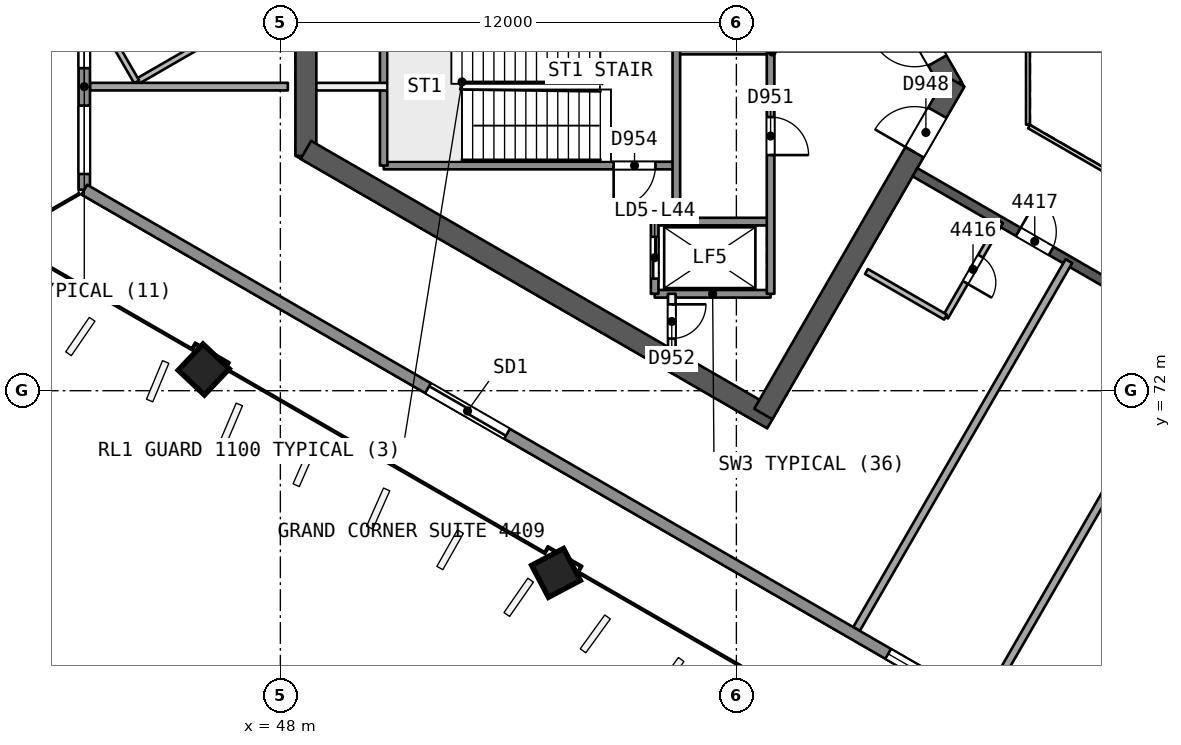
"""IFC4 building model, lengths in metres.
Left out: names, types, materials, properties, quantities, classifications, styles, units other than length and angle.
Written with IfcOpenShell. Run it as: python <this file> out.ifc"""

import sys

from ifc_helpers import new_model, si_unit, direction, frame, frame_2d, origin, origin_2d, place, context, subcontext, project, spatial, rectangle, extrude, element, fill, save


model = new_model("IFC4")
c1 = context("Model", 3, precision=1e-05, world=origin(), true_north=direction((0.0, 1.0)))
c2 = subcontext(c1, "Body", "Model", "MODEL_VIEW")
j1 = project(units=[si_unit("LENGTHUNIT", "METRE"), si_unit("PLANEANGLEUNIT", "RADIAN")], contexts=[c1])
p1 = place(None, origin())
s1 = spatial("IfcSite", under=j1, at=p1, CompositionType="ELEMENT")
p2 = place(p1, origin())
s2 = spatial("IfcBuilding", under=s1, at=p2, CompositionType="ELEMENT")
p3 = place(p2, frame((0.0, 0.0, 182.2)))
s3 = spatial("IfcBuildingStorey", under=s2, at=p3, CompositionType="ELEMENT", Elevation=182.2)
p4 = place(p3, frame((65.682, 80.0, 0.0), z_axis=(0.0, 0.0, 1.0), x_axis=(-0.500000202252, 0.866025287014, 0.0)))
e1 = element("IfcWall", 1, at=p4, inside=s3, PredefinedType="SHEAR", context=c2, shape_type="SweptSolid", body=[
    extrude(rectangle(XDim=10.221, YDim=0.55, at=frame_2d((5.111, 0.0))), origin(), (0.0, 0.0, 1.0), 3.7),
])
p5 = place(p4, frame((0.791, 0.0, 0.0)))
e2 = element("IfcOpeningElement", 2, at=p5, cuts=e1, PredefinedType="OPENING", context=c2, shape_type="SweptSolid", body=[
    extrude(rectangle(XDim=1.2, YDim=2.1, at=frame_2d((0.6, 1.05))), frame((0.0, 0.286, 0.0), z_axis=(0.0, -1.0, 0.0), x_axis=(1.0, 0.0, 0.0)), (0.0, 0.0, 1.0), 0.571),
])
p6 = place(p3, frame((48.672, 81.664, 0.0), z_axis=(0.0, 0.0, 1.0), x_axis=(0.0, -1.0, 0.0)))
e3 = element("IfcWall", 3, at=p6, inside=s3, PredefinedType="SHEAR", context=c2, shape_type="SweptSolid", body=[
    extrude(rectangle(XDim=3.487, YDim=0.55, at=frame_2d((1.743, 0.0))), origin(), (0.0, 0.0, 1.0), 3.7),
])
p7 = place(p3, frame((48.672, 78.336, 0.0), z_axis=(0.0, 0.0, 1.0), x_axis=(0.866023530946, -0.500003243837, 0.0)))
e4 = element("IfcWall", 4, at=p7, inside=s3, PredefinedType="SHEAR", context=c2, shape_type="SweptSolid", body=[
    extrude(rectangle(XDim=14.175, YDim=0.55, at=frame_2d((7.087, 0.0))), origin(), (0.0, 0.0, 1.0), 3.7),
])
p8 = place(p3, frame((60.709, 71.386, 0.0), z_axis=(0.0, 0.0, 1.0), x_axis=(0.500015938302, 0.866016201606, 0.0)))
e5 = element("IfcWall", 5, at=p8, inside=s3, PredefinedType="SHEAR", context=c2, shape_type="SweptSolid", body=[
    extrude(rectangle(XDim=10.105, YDim=0.55, at=frame_2d((5.053, 0.0))), origin(), (0.0, 0.0, 1.0), 3.7),
])
p9 = place(p8, frame((7.955, 0.0, 0.0)))
e6 = element("IfcOpeningElement", 6, at=p9, cuts=e5, PredefinedType="OPENING", context=c2, shape_type="SweptSolid", body=[
    extrude(rectangle(XDim=1.2, YDim=2.1, at=frame_2d((0.6, 1.05))), frame((0.0, 0.286, 0.0), z_axis=(0.0, -1.0, 0.0), x_axis=(1.0, 0.0, 0.0)), (0.0, 0.0, 1.0), 0.571),
])
p10 = place(p3, frame((64.7, 77.748, 0.0), z_axis=(0.0, 0.0, 1.0), x_axis=(0.866026492143, -0.499998114903, 0.0)))
e7 = element("IfcWall", 7, at=p10, inside=s3, PredefinedType="SHEAR", context=c2, shape_type="SweptSolid", body=[
    extrude(rectangle(XDim=15.588, YDim=0.25, at=frame_2d((7.794, 0.0))), origin(), (0.0, 0.0, 1.0), 3.25),
])
p11 = place(p10, frame((3.138, 0.0, 0.0)))
e8 = element("IfcOpeningElement", 8, at=p11, cuts=e7, PredefinedType="OPENING", context=c2, shape_type="SweptSolid", body=[
    extrude(rectangle(XDim=1.0, YDim=2.1, at=frame_2d((0.5, 1.05))), frame((0.0, 0.135, 0.0), z_axis=(0.0, -1.0, 0.0), x_axis=(1.0, 0.0, 0.0)), (0.0, 0.0, 1.0), 0.271),
])
p12 = place(p10, frame((6.175, 0.0, 0.0)))
e9 = element("IfcOpeningElement", 9, at=p12, cuts=e7, PredefinedType="OPENING", context=c2, shape_type="SweptSolid", body=[
    extrude(rectangle(XDim=0.9, YDim=2.1, at=frame_2d((0.45, 1.05))), frame((0.0, 0.135, 0.0), z_axis=(0.0, -1.0, 0.0), x_axis=(1.0, 0.0, 0.0)), (0.0, 0.0, 1.0), 0.271),
])
p13 = place(p10, frame((10.072, 0.0, 0.0)))
e10 = element("IfcOpeningElement", 10, at=p13, cuts=e7, PredefinedType="OPENING", context=c2, shape_type="SweptSolid", body=[
    extrude(rectangle(XDim=0.9, YDim=2.1, at=frame_2d((0.45, 1.05))), frame((0.0, 0.135, 0.0), z_axis=(0.0, -1.0, 0.0), x_axis=(1.0, 0.0, 0.0)), (0.0, 0.0, 1.0), 0.271),
])
p14 = place(p10, frame((13.53, 0.0, 0.0)))
e11 = element("IfcOpeningElement", 11, at=p14, cuts=e7, PredefinedType="OPENING", context=c2, shape_type="SweptSolid", body=[
    extrude(rectangle(XDim=1.0, YDim=2.1, at=frame_2d((0.5, 1.05))), frame((0.0, 0.135, 0.0), z_axis=(0.0, -1.0, 0.0), x_axis=(1.0, 0.0, 0.0)), (0.0, 0.0, 1.0), 0.271),
])
p15 = place(p3, frame((45.949, 72.55, 0.0), z_axis=(0.02855911485, 0.006793507689, 0.999569019734), x_axis=(-0.865323246693, 0.500760552185, 0.021320133879)))
e12 = element("IfcColumn", 12, at=p15, inside=s3, PredefinedType="COLUMN", context=c2, shape_type="SweptSolid", body=[
    extrude(rectangle(XDim=0.95, YDim=0.95, at=origin_2d()), origin(), (0.0, 0.0, 1.0), 3.702),
])
p16 = place(p3, frame((55.23, 67.192, 0.0), z_axis=(0.019328516974, 0.012138044789, 0.999739504221), x_axis=(-0.865694061334, 0.500459928951, 0.010660754407)))
e13 = element("IfcColumn", 13, at=p16, inside=s3, PredefinedType="COLUMN", context=c2, shape_type="SweptSolid", body=[
    extrude(rectangle(XDim=0.95, YDim=0.95, at=origin_2d()), origin(), (0.0, 0.0, 1.0), 3.701),
])
p17 = place(p3, frame((46.47, 81.427, 0.0), z_axis=(0.0, 0.0, 1.0), x_axis=(-0.866062058628, -0.499936506574, 0.0)))
e14 = element("IfcWall", 14, at=p17, inside=s3, PredefinedType="PARTITIONING", context=c2, shape_type="SweptSolid", body=[
    extrude(rectangle(XDim=2.6, YDim=0.15, at=frame_2d((1.3, 0.0))), origin(), (0.0, 0.0, 1.0), 3.25),
])
p18 = place(p3, frame((44.218, 80.128, 0.0), z_axis=(0.0, 0.0, 1.0), x_axis=(-0.499997745557, 0.866026705384, 0.0)))
e15 = element("IfcWall", 15, at=p18, inside=s3, PredefinedType="PARTITIONING", context=c2, shape_type="SweptSolid", body=[
    extrude(rectangle(XDim=2.457, YDim=0.15, at=frame_2d((1.228, 0.0))), origin(), (0.0, 0.0, 1.0), 3.25),
])
p19 = place(p3, frame((42.99, 80.001, 0.0), z_axis=(0.0, 0.0, 1.0), x_axis=(1.0, 0.0, 0.0)))
e16 = element("IfcWall", 16, at=p19, inside=s3, PredefinedType="PARTITIONING", context=c2, shape_type="SweptSolid", body=[
    extrude(rectangle(XDim=5.208, YDim=0.2, at=frame_2d((2.604, 0.0))), origin(), (0.0, 0.0, 1.0), 3.25),
])
p20 = place(p3, frame((66.952, 76.448, 0.0), z_axis=(0.0, 0.0, 1.0), x_axis=(-0.499987231761, -0.866032775405, 0.0)))
e17 = element("IfcWall", 17, at=p20, inside=s3, PredefinedType="PARTITIONING", context=c2, shape_type="SweptSolid", body=[
    extrude(rectangle(XDim=2.9, YDim=0.15, at=frame_2d((1.45, 0.0))), origin(), (0.0, 0.0, 1.0), 3.25),
])
p21 = place(p20, frame((1.05, 0.0, 0.0)))
e18 = element("IfcOpeningElement", 18, at=p21, cuts=e17, PredefinedType="OPENING", context=c2, shape_type="SweptSolid", body=[
    extrude(rectangle(XDim=0.8, YDim=2.1, at=frame_2d((0.4, 1.05))), frame((0.0, 0.085, 0.0), z_axis=(0.0, -1.0, 0.0), x_axis=(1.0, 0.0, 0.0)), (0.0, 0.0, 1.0), 0.171),
])
p22 = place(p3, frame((65.502, 73.937, 0.0), z_axis=(0.0, 0.0, 1.0), x_axis=(-0.865994240961, 0.500053971709, 0.0)))
e19 = element("IfcWall", 19, at=p22, inside=s3, PredefinedType="PARTITIONING", context=c2, shape_type="SweptSolid", body=[
    extrude(rectangle(XDim=2.401, YDim=0.15, at=frame_2d((1.201, 0.0))), origin(), (0.0, 0.0, 1.0), 3.25),
])
for number, where, z_axis, x_axis in (
    (20, (63.161, 65.729, 0.0), (0.0, 0.0, 1.0), (0.5, 0.866, 0.0)),
    (21, (66.536, 63.781, 0.0), (0.0, 0.0, 1.0), (0.5, 0.866, 0.0)),
):
    element("IfcWall", number, at=place(p3, frame(where, z_axis=z_axis, x_axis=x_axis)), inside=s3, PredefinedType="PARTITIONING", context=c2, shape_type="SweptSolid", body=[
        extrude(rectangle(XDim=11.178, YDim=0.2, at=frame_2d((5.589, 0.0))), origin(), (0.0, 0.0, 1.0), 3.25),
    ])
p23 = place(p3, frame((42.841, 77.289, 0.0), z_axis=(0.0, 0.0, 1.0), x_axis=(0.0, 1.0, 0.0)))
e22 = element("IfcWall", 22, at=p23, inside=s3, PredefinedType="SOLIDWALL", context=c2, shape_type="SweptSolid", body=[
    extrude(rectangle(XDim=5.421, YDim=0.3, at=frame_2d((2.711, 0.0))), origin(), (0.0, 0.0, 1.0), 3.25),
])
p24 = place(p23, frame((3.198, 0.0, 0.9)))
e23 = element("IfcOpeningElement", 23, at=p24, cuts=e22, PredefinedType="OPENING", context=c2, shape_type="SweptSolid", body=[
    extrude(rectangle(XDim=1.8, YDim=1.5, at=frame_2d((0.9, 0.75))), frame((0.0, 0.161, 0.0), z_axis=(0.0, -1.0, 0.0), x_axis=(1.0, 0.0, 0.0)), (0.0, 0.0, 1.0), 0.321),
])
p25 = place(p23, frame((0.413, 0.0, 0.9)))
e24 = element("IfcOpeningElement", 24, at=p25, cuts=e22, PredefinedType="OPENING", context=c2, shape_type="SweptSolid", body=[
    extrude(rectangle(XDim=1.8, YDim=1.5, at=frame_2d((0.9, 0.75))), frame((0.0, 0.161, 0.0), z_axis=(0.0, -1.0, 0.0), x_axis=(1.0, 0.0, 0.0)), (0.0, 0.0, 1.0), 0.321),
])
p26 = place(p3, frame((88.732, 50.794, 0.0), z_axis=(0.0, 0.0, 1.0), x_axis=(-0.866024774967, 0.500001089142, 0.0)))
e25 = element("IfcWall", 25, at=p26, inside=s3, PredefinedType="SOLIDWALL", context=c2, shape_type="SweptSolid", body=[
    extrude(rectangle(XDim=52.991, YDim=0.3, at=frame_2d((26.496, 0.0))), origin(), (0.0, 0.0, 1.0), 3.25),
])
p27 = place(p26, frame((19.06, 0.0, 0.0)))
e26 = element("IfcOpeningElement", 26, at=p27, cuts=e25, PredefinedType="OPENING", context=c2, shape_type="SweptSolid", body=[
    extrude(rectangle(XDim=2.4, YDim=2.4, at=frame_2d((1.2, 1.2))), frame((0.0, 0.161, 0.0), z_axis=(0.0, -1.0, 0.0), x_axis=(1.0, 0.0, 0.0)), (0.0, 0.0, 1.0), 0.321),
])
p28 = place(p26, frame((9.392, 0.0, 0.0)))
e27 = element("IfcOpeningElement", 27, at=p28, cuts=e25, PredefinedType="OPENING", context=c2, shape_type="SweptSolid", body=[
    extrude(rectangle(XDim=2.4, YDim=2.4, at=frame_2d((1.2, 1.2))), frame((0.0, 0.161, 0.0), z_axis=(0.0, -1.0, 0.0), x_axis=(1.0, 0.0, 0.0)), (0.0, 0.0, 1.0), 0.321),
])
p29 = place(p26, frame((40.145, 0.0, 0.0)))
e28 = element("IfcOpeningElement", 28, at=p29, cuts=e25, PredefinedType="OPENING", context=c2, shape_type="SweptSolid", body=[
    extrude(rectangle(XDim=2.4, YDim=2.4, at=frame_2d((1.2, 1.2))), frame((0.0, 0.161, 0.0), z_axis=(0.0, -1.0, 0.0), x_axis=(1.0, 0.0, 0.0)), (0.0, 0.0, 1.0), 0.321),
])
p30 = place(p26, frame((26.765, 0.0, 0.9)))
e29 = element("IfcOpeningElement", 29, at=p30, cuts=e25, PredefinedType="OPENING", context=c2, shape_type="SweptSolid", body=[
    extrude(rectangle(XDim=1.8, YDim=1.5, at=frame_2d((0.9, 0.75))), frame((0.0, 0.161, 0.0), z_axis=(0.0, -1.0, 0.0), x_axis=(1.0, 0.0, 0.0)), (0.0, 0.0, 1.0), 0.321),
])
p31 = place(p26, frame((22.867, 0.0, 0.9)))
e30 = element("IfcOpeningElement", 30, at=p31, cuts=e25, PredefinedType="OPENING", context=c2, shape_type="SweptSolid", body=[
    extrude(rectangle(XDim=1.8, YDim=1.5, at=frame_2d((0.9, 0.75))), frame((0.0, 0.161, 0.0), z_axis=(0.0, -1.0, 0.0), x_axis=(1.0, 0.0, 0.0)), (0.0, 0.0, 1.0), 0.321),
])
p32 = place(p3, frame((60.9, 80.95, 0.0), z_axis=(0.0, 0.0, 1.0), x_axis=(-1.0, 0.0, 0.0)))
e31 = element("IfcWall", 31, at=p32, inside=s3, PredefinedType="SOLIDWALL", context=c2, shape_type="SweptSolid", body=[
    extrude(rectangle(XDim=2.48, YDim=0.2, at=frame_2d((1.24, 0.0))), origin(), (0.0, 0.0, 1.0), 3.25),
])
p33 = place(p3, frame((50.82, 80.0, 0.0), z_axis=(0.0, 0.0, 1.0), x_axis=(-1.0, 0.0, 0.0)))
e32 = element("IfcWall", 32, at=p33, inside=s3, PredefinedType="PARTITIONING", context=c2, shape_type="SweptSolid", body=[
    extrude(rectangle(XDim=1.873, YDim=0.2, at=frame_2d((0.937, 0.0))), origin(), (0.0, 0.0, 1.0), 3.25),
])
p34 = place(p3, frame((58.42, 77.925, 0.0), z_axis=(0.0, 0.0, 1.0), x_axis=(-1.0, 0.0, 0.0)))
e33 = element("IfcWall", 33, at=p34, inside=s3, PredefinedType="SOLIDWALL", context=c2, shape_type="SweptSolid", body=[
    extrude(rectangle(XDim=7.7, YDim=0.2, at=frame_2d((3.85, 0.0))), origin(), (0.0, 0.0, 1.0), 3.25),
])
p35 = place(p34, frame((0.55, 0.0, 0.0)))
e34 = element("IfcOpeningElement", 34, at=p35, cuts=e33, PredefinedType="OPENING", context=c2, shape_type="SweptSolid", body=[
    extrude(rectangle(XDim=1.1, YDim=2.1, at=frame_2d((0.55, 1.05))), frame((0.0, 0.11, 0.0), z_axis=(0.0, -1.0, 0.0), x_axis=(1.0, 0.0, 0.0)), (0.0, 0.0, 1.0), 0.221),
])
for number, where, z_axis, x_axis in (
    (35, (60.9, 76.45, 0.0), (0.0, 0.0, 1.0), (-1.0, 0.0, 0.0)),
    (36, (60.9, 74.55, 0.0), (0.0, 0.0, 1.0), (-1.0, 0.0, 0.0)),
):
    element("IfcWall", number, at=place(p3, frame(where, z_axis=z_axis, x_axis=x_axis)), inside=s3, PredefinedType="SOLIDWALL", context=c2, shape_type="SweptSolid", body=[
        extrude(rectangle(XDim=3.05, YDim=0.2, at=frame_2d((1.525, 0.0))), origin(), (0.0, 0.0, 1.0), 3.25),
    ])
p36 = place(p3, frame((60.9, 85.45, 0.0), z_axis=(0.0, 0.0, 1.0), x_axis=(0.0, -1.0, 0.0)))
e37 = element("IfcWall", 37, at=p36, inside=s3, PredefinedType="SOLIDWALL", context=c2, shape_type="SweptSolid", body=[
    extrude(rectangle(XDim=10.9, YDim=0.2, at=frame_2d((5.45, 0.0))), origin(), (0.0, 0.0, 1.0), 3.25),
])
p37 = place(p36, frame((0.625, 0.0, 0.0)))
e38 = element("IfcOpeningElement", 38, at=p37, cuts=e37, PredefinedType="OPENING", context=c2, shape_type="SweptSolid", body=[
    extrude(rectangle(XDim=1.0, YDim=2.1, at=frame_2d((0.5, 1.05))), frame((0.0, 0.11, 0.0), z_axis=(0.0, -1.0, 0.0), x_axis=(1.0, 0.0, 0.0)), (0.0, 0.0, 1.0), 0.221),
])
p38 = place(p36, frame((2.875, 0.0, 0.0)))
e39 = element("IfcOpeningElement", 39, at=p38, cuts=e37, PredefinedType="OPENING", context=c2, shape_type="SweptSolid", body=[
    extrude(rectangle(XDim=1.0, YDim=2.1, at=frame_2d((0.5, 1.05))), frame((0.0, 0.11, 0.0), z_axis=(0.0, -1.0, 0.0), x_axis=(1.0, 0.0, 0.0)), (0.0, 0.0, 1.0), 0.221),
])
p39 = place(p36, frame((6.25, 0.0, 0.0)))
e40 = element("IfcOpeningElement", 40, at=p39, cuts=e37, PredefinedType="OPENING", context=c2, shape_type="SweptSolid", body=[
    extrude(rectangle(XDim=1.0, YDim=2.1, at=frame_2d((0.5, 1.05))), frame((0.0, 0.11, 0.0), z_axis=(0.0, -1.0, 0.0), x_axis=(1.0, 0.0, 0.0)), (0.0, 0.0, 1.0), 0.221),
])
p40 = place(p3, frame((58.42, 86.974, 0.0), z_axis=(0.0, 0.0, 1.0), x_axis=(0.0, -1.0, 0.0)))
e41 = element("IfcWall", 41, at=p40, inside=s3, PredefinedType="SOLIDWALL", context=c2, shape_type="SweptSolid", body=[
    extrude(rectangle(XDim=10.524, YDim=0.2, at=frame_2d((5.262, 0.0))), origin(), (0.0, 0.0, 1.0), 3.25),
])
p41 = place(p40, frame((0.312, 0.0, 0.0)))
e42 = element("IfcOpeningElement", 42, at=p41, cuts=e41, PredefinedType="OPENING", context=c2, shape_type="SweptSolid", body=[
    extrude(rectangle(XDim=0.9, YDim=2.1, at=frame_2d((0.45, 1.05))), frame((0.0, 0.11, 0.0), z_axis=(0.0, -1.0, 0.0), x_axis=(1.0, 0.0, 0.0)), (0.0, 0.0, 1.0), 0.221),
])
p42 = place(p3, frame((58.3, 74.55, 0.0), z_axis=(0.0, 0.0, 1.0), x_axis=(0.0, -1.0, 0.0)))
e43 = element("IfcWall", 43, at=p42, inside=s3, PredefinedType="PARTITIONING", context=c2, shape_type="SweptSolid", body=[
    extrude(rectangle(XDim=1.455, YDim=0.2, at=frame_2d((0.728, 0.0))), origin(), (0.0, 0.0, 1.0), 3.25),
])
p43 = place(p42, frame((0.278, 0.0, 0.0)))
e44 = element("IfcOpeningElement", 44, at=p43, cuts=e43, PredefinedType="OPENING", context=c2, shape_type="SweptSolid", body=[
    extrude(rectangle(XDim=0.9, YDim=2.1, at=frame_2d((0.45, 1.05))), frame((0.0, 0.11, 0.0), z_axis=(0.0, -1.0, 0.0), x_axis=(1.0, 0.0, 0.0)), (0.0, 0.0, 1.0), 0.221),
])
p44 = place(p3, frame((57.85, 76.45, 0.0), z_axis=(0.0, 0.0, 1.0), x_axis=(0.0, -1.0, 0.0)))
e45 = element("IfcWall", 45, at=p44, inside=s3, PredefinedType="SOLIDWALL", context=c2, shape_type="SweptSolid", body=[
    extrude(rectangle(XDim=1.9, YDim=0.2, at=frame_2d((0.95, 0.0))), origin(), (0.0, 0.0, 1.0), 3.25),
])
p45 = place(p44, frame((0.4, 0.0, 0.0)))
e46 = element("IfcOpeningElement", 46, at=p45, cuts=e45, PredefinedType="OPENING", context=c2, shape_type="SweptSolid", body=[
    extrude(rectangle(XDim=1.1, YDim=2.1, at=frame_2d((0.55, 1.05))), frame((0.0, 0.11, 0.0), z_axis=(0.0, -1.0, 0.0), x_axis=(1.0, 0.0, 0.0)), (0.0, 0.0, 1.0), 0.221),
])
p46 = place(p3, frame((50.72, 82.075, 0.0), z_axis=(0.0, 0.0, 1.0), x_axis=(0.0, -1.0, 0.0)))
e47 = element("IfcWall", 47, at=p46, inside=s3, PredefinedType="SOLIDWALL", context=c2, shape_type="SweptSolid", body=[
    extrude(rectangle(XDim=4.15, YDim=0.2, at=frame_2d((2.075, 0.0))), origin(), (0.0, 0.0, 1.0), 3.25),
])
p47 = place(p3, frame((67.672, 81.0, 0.0), z_axis=(0.0, 0.0, 1.0), x_axis=(0.0, -1.0, 0.0)))
e48 = element("IfcWall", 48, at=p47, inside=s3, PredefinedType="PARTITIONING", context=c2, shape_type="SweptSolid", body=[
    extrude(rectangle(XDim=2.0, YDim=0.1, at=frame_2d((1.0, 0.0))), origin(), (0.0, 0.0, 1.0), 3.25),
])
p48 = place(p3, frame((67.702, 78.948, 0.0), z_axis=(0.0, 0.0, 1.0), x_axis=(0.866026658274, -0.499997827154, 0.0)))
e49 = element("IfcWall", 49, at=p48, inside=s3, PredefinedType="PARTITIONING", context=c2, shape_type="SweptSolid", body=[
    extrude(rectangle(XDim=11.588, YDim=0.1, at=frame_2d((5.794, 0.0))), origin(), (0.0, 0.0, 1.0), 3.25),
])
p49 = place(p21, origin())
e50 = element("IfcDoor", 50, at=p49, inside=s3, OperationType="SINGLE_SWING_RIGHT", PredefinedType="NOTDEFINED", context=c2, shape_type="SweptSolid", body=[
    extrude(rectangle(XDim=0.8, YDim=2.1, at=frame_2d((0.4, 1.05))), frame((0.0, 0.025, 0.0), z_axis=(0.0, -1.0, 0.0), x_axis=(1.0, 0.0, 0.0)), (0.0, 0.0, 1.0), 0.05),
])
fill(e18, e50)
p50 = place(p11, origin())
e51 = element("IfcDoor", 51, at=p50, inside=s3, OperationType="SINGLE_SWING_LEFT", PredefinedType="NOTDEFINED", context=c2, shape_type="SweptSolid", body=[
    extrude(rectangle(XDim=1.0, YDim=2.1, at=frame_2d((0.5, 1.05))), frame((0.0, 0.025, 0.0), z_axis=(0.0, -1.0, 0.0), x_axis=(1.0, 0.0, 0.0)), (0.0, 0.0, 1.0), 0.05),
])
fill(e8, e51)
p51 = place(p24, origin())
e52 = element("IfcWindow", 52, at=p51, inside=s3, PartitioningType="SINGLE_PANEL", PredefinedType="WINDOW", context=c2, shape_type="SweptSolid", body=[
    extrude(rectangle(XDim=1.8, YDim=1.5, at=frame_2d((0.9, 0.75))), frame((0.0, 0.03, 0.0), z_axis=(0.0, -1.0, 0.0), x_axis=(1.0, 0.0, 0.0)), (0.0, 0.0, 1.0), 0.06),
])
fill(e23, e52)
p52 = place(p25, origin())
e53 = element("IfcWindow", 53, at=p52, inside=s3, PartitioningType="SINGLE_PANEL", PredefinedType="WINDOW", context=c2, shape_type="SweptSolid", body=[
    extrude(rectangle(XDim=1.8, YDim=1.5, at=frame_2d((0.9, 0.75))), frame((0.0, 0.03, 0.0), z_axis=(0.0, -1.0, 0.0), x_axis=(1.0, 0.0, 0.0)), (0.0, 0.0, 1.0), 0.06),
])
fill(e24, e53)
p53 = place(p29, origin())
e54 = element("IfcDoor", 54, at=p53, inside=s3, OperationType="SLIDING_TO_LEFT", PredefinedType="NOTDEFINED", context=c2, shape_type="SweptSolid", body=[
    extrude(rectangle(XDim=2.4, YDim=2.4, at=frame_2d((1.2, 1.2))), frame((0.0, 0.025, 0.0), z_axis=(0.0, -1.0, 0.0), x_axis=(1.0, 0.0, 0.0)), (0.0, 0.0, 1.0), 0.05),
])
fill(e28, e54)
p54 = place(p30, origin())
e55 = element("IfcWindow", 55, at=p54, inside=s3, PartitioningType="SINGLE_PANEL", PredefinedType="WINDOW", context=c2, shape_type="SweptSolid", body=[
    extrude(rectangle(XDim=1.8, YDim=1.5, at=frame_2d((0.9, 0.75))), frame((0.0, 0.03, 0.0), z_axis=(0.0, -1.0, 0.0), x_axis=(1.0, 0.0, 0.0)), (0.0, 0.0, 1.0), 0.06),
])
fill(e29, e55)
p55 = place(p5, origin())
e56 = element("IfcDoor", 56, at=p55, inside=s3, OperationType="SINGLE_SWING_RIGHT", PredefinedType="NOTDEFINED", context=c2, shape_type="SweptSolid", body=[
    extrude(rectangle(XDim=1.2, YDim=2.1, at=frame_2d((0.6, 1.05))), frame((0.0, 0.025, 0.0), z_axis=(0.0, -1.0, 0.0), x_axis=(1.0, 0.0, 0.0)), (0.0, 0.0, 1.0), 0.05),
])
fill(e2, e56)
p56 = place(p9, origin())
e57 = element("IfcDoor", 57, at=p56, inside=s3, OperationType="SINGLE_SWING_LEFT", PredefinedType="NOTDEFINED", context=c2, shape_type="SweptSolid", body=[
    extrude(rectangle(XDim=1.2, YDim=2.1, at=frame_2d((0.6, 1.05))), frame((0.0, 0.025, 0.0), z_axis=(0.0, -1.0, 0.0), x_axis=(1.0, 0.0, 0.0)), (0.0, 0.0, 1.0), 0.05),
])
fill(e6, e57)
p57 = place(p45, origin())
e58 = element("IfcDoor", 58, at=p57, inside=s3, OperationType="SLIDING_TO_RIGHT", PredefinedType="NOTDEFINED", context=c2, shape_type="SweptSolid", body=[
    extrude(rectangle(XDim=1.1, YDim=2.1, at=frame_2d((0.55, 1.05))), frame((0.0, 0.025, 0.0), z_axis=(0.0, -1.0, 0.0), x_axis=(1.0, 0.0, 0.0)), (0.0, 0.0, 1.0), 0.05),
])
fill(e46, e58)
p58 = place(p39, origin())
e59 = element("IfcDoor", 59, at=p58, inside=s3, OperationType="SINGLE_SWING_RIGHT", PredefinedType="NOTDEFINED", context=c2, shape_type="SweptSolid", body=[
    extrude(rectangle(XDim=1.0, YDim=2.1, at=frame_2d((0.5, 1.05))), frame((0.0, 0.025, 0.0), z_axis=(0.0, -1.0, 0.0), x_axis=(1.0, 0.0, 0.0)), (0.0, 0.0, 1.0), 0.05),
])
fill(e40, e59)
p59 = place(p43, origin())
e60 = element("IfcDoor", 60, at=p59, inside=s3, OperationType="SINGLE_SWING_LEFT", PredefinedType="NOTDEFINED", context=c2, shape_type="SweptSolid", body=[
    extrude(rectangle(XDim=0.9, YDim=2.1, at=frame_2d((0.45, 1.05))), frame((0.0, 0.025, 0.0), z_axis=(0.0, -1.0, 0.0), x_axis=(1.0, 0.0, 0.0)), (0.0, 0.0, 1.0), 0.05),
])
fill(e44, e60)
p60 = place(p35, origin())
e61 = element("IfcDoor", 61, at=p60, inside=s3, OperationType="SINGLE_SWING_RIGHT", PredefinedType="NOTDEFINED", context=c2, shape_type="SweptSolid", body=[
    extrude(rectangle(XDim=1.1, YDim=2.1, at=frame_2d((0.55, 1.05))), frame((0.0, 0.025, 0.0), z_axis=(0.0, -1.0, 0.0), x_axis=(1.0, 0.0, 0.0)), (0.0, 0.0, 1.0), 0.05),
])
fill(e34, e61)
save(model, sys.argv[1])
